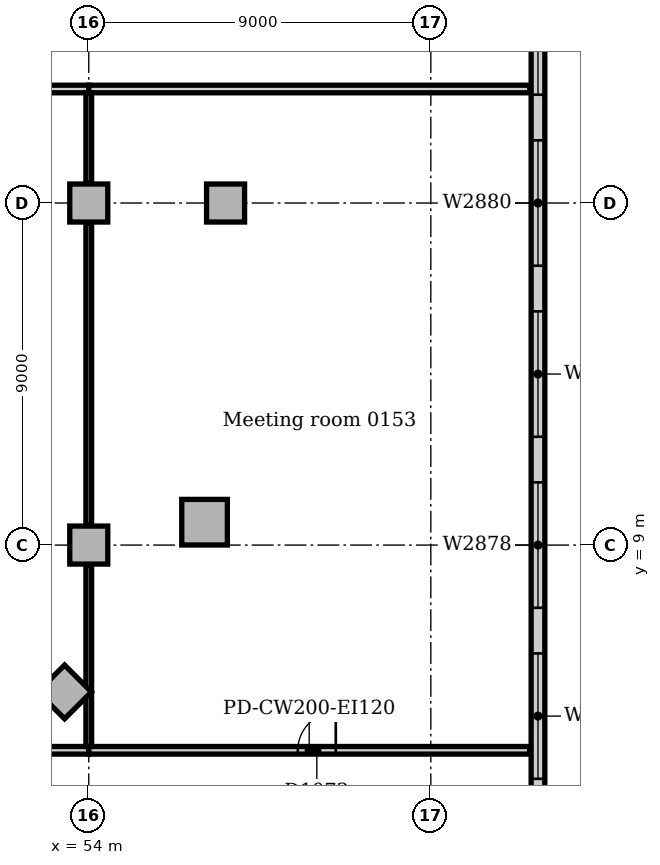
"""IFC4 building model, lengths in metres.
Left out: names, types, materials, properties, quantities, classifications, styles, units other than length and angle.
Written with IfcOpenShell. Run it as: python <this file> out.ifc"""

import sys

from ifc_helpers import new_model, si_unit, direction, frame, frame_2d, origin, origin_2d, place, context, subcontext, project, spatial, rectangle, extrude, element, fill, save


model = new_model("IFC4")
c1 = context("Model", 3, precision=1e-05, world=origin(), true_north=direction((0.0, 1.0)))
c2 = subcontext(c1, "Body", "Model", "MODEL_VIEW")
j1 = project(units=[si_unit("LENGTHUNIT", "METRE"), si_unit("PLANEANGLEUNIT", "RADIAN")], contexts=[c1])
p1 = place(None, origin())
s1 = spatial("IfcSite", under=j1, at=p1, CompositionType="ELEMENT")
p2 = place(p1, origin())
s2 = spatial("IfcBuilding", under=s1, at=p2, CompositionType="ELEMENT")
p3 = place(p2, frame((0.0, 0.0, 6.0)))
s3 = spatial("IfcBuildingStorey", under=s2, at=p3, CompositionType="ELEMENT", Elevation=6.0)
p4 = place(p3, frame((57.047, 9.602, 0.0), z_axis=(0.0, 0.0, 1.0), x_axis=(1.0, 0.0, 0.0)))
e1 = element("IfcColumn", 1, at=p4, inside=s3, PredefinedType="COLUMN", context=c2, shape_type="SweptSolid", body=[
    extrude(rectangle(XDim=1.2, YDim=1.2, at=origin_2d()), origin(), (0.0, 0.0, 1.0), 4.7),
])
for number, where, z_axis, x_axis in (
    (2, (53.364, 5.136, 0.0), (0.0, 0.0, 1.0), (0.707, 0.707, 0.0)),
    (3, (57.6, 18.0, 0.0), (0.0, 0.0, 1.0), (1.0, 0.0, 0.0)),
    (4, (54.0, 9.0, 0.0), (0.0, 0.0, 1.0), (1.0, 0.0, 0.0)),
    (5, (54.0, 18.0, 0.0), (0.0, 0.0, 1.0), (1.0, 0.0, 0.0)),
):
    element("IfcColumn", number, at=place(p3, frame(where, z_axis=z_axis, x_axis=x_axis)), inside=s3, PredefinedType="COLUMN", context=c2, shape_type="SweptSolid", body=[
        extrude(rectangle(XDim=1.0, YDim=1.0, at=origin_2d()), origin(), (0.0, 0.0, 1.0), 4.7),
    ])
p5 = place(p3, frame((65.82, -9.0, 0.0), z_axis=(0.0, 0.0, 1.0), x_axis=(0.0, 1.0, 0.0)))
e6 = element("IfcWall", 6, at=p5, inside=s3, PredefinedType="STANDARD", context=c2, shape_type="SweptSolid", body=[
    extrude(rectangle(XDim=63.0, YDim=0.36, at=frame_2d((31.5, 0.0))), origin(), (0.0, 0.0, 1.0), 4.7),
])
p6 = place(p5, frame((2.85, 0.0, 0.9)))
e7 = element("IfcOpeningElement", 7, at=p6, cuts=e6, PredefinedType="OPENING", context=c2, shape_type="SweptSolid", body=[
    extrude(rectangle(XDim=3.3, YDim=2.4, at=frame_2d((1.65, 1.2))), frame((0.0, 0.19, 0.0), z_axis=(0.0, -1.0, 0.0), x_axis=(1.0, 0.0, 0.0)), (0.0, 0.0, 1.0), 0.38),
])
p7 = place(p5, frame((7.35, 0.0, 0.9)))
e8 = element("IfcOpeningElement", 8, at=p7, cuts=e6, PredefinedType="OPENING", context=c2, shape_type="SweptSolid", body=[
    extrude(rectangle(XDim=3.3, YDim=2.4, at=frame_2d((1.65, 1.2))), frame((0.0, 0.19, 0.0), z_axis=(0.0, -1.0, 0.0), x_axis=(1.0, 0.0, 0.0)), (0.0, 0.0, 1.0), 0.38),
])
p8 = place(p5, frame((11.85, 0.0, 0.9)))
e9 = element("IfcOpeningElement", 9, at=p8, cuts=e6, PredefinedType="OPENING", context=c2, shape_type="SweptSolid", body=[
    extrude(rectangle(XDim=3.3, YDim=2.4, at=frame_2d((1.65, 1.2))), frame((0.0, 0.19, 0.0), z_axis=(0.0, -1.0, 0.0), x_axis=(1.0, 0.0, 0.0)), (0.0, 0.0, 1.0), 0.38),
])
p9 = place(p5, frame((16.35, 0.0, 0.9)))
e10 = element("IfcOpeningElement", 10, at=p9, cuts=e6, PredefinedType="OPENING", context=c2, shape_type="SweptSolid", body=[
    extrude(rectangle(XDim=3.3, YDim=2.4, at=frame_2d((1.65, 1.2))), frame((0.0, 0.19, 0.0), z_axis=(0.0, -1.0, 0.0), x_axis=(1.0, 0.0, 0.0)), (0.0, 0.0, 1.0), 0.38),
])
p10 = place(p5, frame((20.85, 0.0, 0.9)))
e11 = element("IfcOpeningElement", 11, at=p10, cuts=e6, PredefinedType="OPENING", context=c2, shape_type="SweptSolid", body=[
    extrude(rectangle(XDim=3.3, YDim=2.4, at=frame_2d((1.65, 1.2))), frame((0.0, 0.19, 0.0), z_axis=(0.0, -1.0, 0.0), x_axis=(1.0, 0.0, 0.0)), (0.0, 0.0, 1.0), 0.38),
])
p11 = place(p5, frame((25.35, 0.0, 0.9)))
e12 = element("IfcOpeningElement", 12, at=p11, cuts=e6, PredefinedType="OPENING", context=c2, shape_type="SweptSolid", body=[
    extrude(rectangle(XDim=3.3, YDim=2.4, at=frame_2d((1.65, 1.2))), frame((0.0, 0.19, 0.0), z_axis=(0.0, -1.0, 0.0), x_axis=(1.0, 0.0, 0.0)), (0.0, 0.0, 1.0), 0.38),
])
p12 = place(p5, frame((29.85, 0.0, 0.9)))
e13 = element("IfcOpeningElement", 13, at=p12, cuts=e6, PredefinedType="OPENING", context=c2, shape_type="SweptSolid", body=[
    extrude(rectangle(XDim=3.3, YDim=2.4, at=frame_2d((1.65, 1.2))), frame((0.0, 0.19, 0.0), z_axis=(0.0, -1.0, 0.0), x_axis=(1.0, 0.0, 0.0)), (0.0, 0.0, 1.0), 0.38),
])
p13 = place(p5, frame((34.35, 0.0, 0.9)))
e14 = element("IfcOpeningElement", 14, at=p13, cuts=e6, PredefinedType="OPENING", context=c2, shape_type="SweptSolid", body=[
    extrude(rectangle(XDim=3.3, YDim=2.4, at=frame_2d((1.65, 1.2))), frame((0.0, 0.19, 0.0), z_axis=(0.0, -1.0, 0.0), x_axis=(1.0, 0.0, 0.0)), (0.0, 0.0, 1.0), 0.38),
])
p14 = place(p5, frame((38.85, 0.0, 0.9)))
e15 = element("IfcOpeningElement", 15, at=p14, cuts=e6, PredefinedType="OPENING", context=c2, shape_type="SweptSolid", body=[
    extrude(rectangle(XDim=3.3, YDim=2.4, at=frame_2d((1.65, 1.2))), frame((0.0, 0.19, 0.0), z_axis=(0.0, -1.0, 0.0), x_axis=(1.0, 0.0, 0.0)), (0.0, 0.0, 1.0), 0.38),
])
p15 = place(p5, frame((43.35, 0.0, 0.9)))
e16 = element("IfcOpeningElement", 16, at=p15, cuts=e6, PredefinedType="OPENING", context=c2, shape_type="SweptSolid", body=[
    extrude(rectangle(XDim=3.3, YDim=2.4, at=frame_2d((1.65, 1.2))), frame((0.0, 0.19, 0.0), z_axis=(0.0, -1.0, 0.0), x_axis=(1.0, 0.0, 0.0)), (0.0, 0.0, 1.0), 0.38),
])
p16 = place(p5, frame((47.85, 0.0, 0.9)))
e17 = element("IfcOpeningElement", 17, at=p16, cuts=e6, PredefinedType="OPENING", context=c2, shape_type="SweptSolid", body=[
    extrude(rectangle(XDim=3.3, YDim=2.4, at=frame_2d((1.65, 1.2))), frame((0.0, 0.19, 0.0), z_axis=(0.0, -1.0, 0.0), x_axis=(1.0, 0.0, 0.0)), (0.0, 0.0, 1.0), 0.38),
])
p17 = place(p5, frame((52.35, 0.0, 0.9)))
e18 = element("IfcOpeningElement", 18, at=p17, cuts=e6, PredefinedType="OPENING", context=c2, shape_type="SweptSolid", body=[
    extrude(rectangle(XDim=3.3, YDim=2.4, at=frame_2d((1.65, 1.2))), frame((0.0, 0.19, 0.0), z_axis=(0.0, -1.0, 0.0), x_axis=(1.0, 0.0, 0.0)), (0.0, 0.0, 1.0), 0.38),
])
p18 = place(p5, frame((56.85, 0.0, 0.9)))
e19 = element("IfcOpeningElement", 19, at=p18, cuts=e6, PredefinedType="OPENING", context=c2, shape_type="SweptSolid", body=[
    extrude(rectangle(XDim=3.3, YDim=2.4, at=frame_2d((1.65, 1.2))), frame((0.0, 0.19, 0.0), z_axis=(0.0, -1.0, 0.0), x_axis=(1.0, 0.0, 0.0)), (0.0, 0.0, 1.0), 0.38),
])
p19 = place(p3, frame((45.0, 3.6, 0.0), z_axis=(0.0, 0.0, 1.0), x_axis=(1.0, 0.0, 0.0)))
e20 = element("IfcWall", 20, at=p19, inside=s3, PredefinedType="PARTITIONING", context=c2, shape_type="SweptSolid", body=[
    extrude(rectangle(XDim=9.0, YDim=0.2, at=frame_2d((4.5, 0.0))), origin(), (0.0, 0.0, 1.0), 4.7),
])
p20 = place(p19, frame((4.0, 0.0, 0.0)))
e21 = element("IfcOpeningElement", 21, at=p20, cuts=e20, PredefinedType="OPENING", context=c2, shape_type="SweptSolid", body=[
    extrude(rectangle(XDim=1.0, YDim=2.1, at=frame_2d((0.5, 1.05))), frame((0.0, 0.11, 0.0), z_axis=(0.0, -1.0, 0.0), x_axis=(1.0, 0.0, 0.0)), (0.0, 0.0, 1.0), 0.22),
])
p21 = place(p3, frame((54.0, 3.6, 0.0), z_axis=(0.0, 0.0, 1.0), x_axis=(1.0, 0.0, 0.0)))
e22 = element("IfcWall", 22, at=p21, inside=s3, PredefinedType="PARTITIONING", context=c2, shape_type="SweptSolid", body=[
    extrude(rectangle(XDim=11.6, YDim=0.2, at=frame_2d((5.8, 0.0))), origin(), (0.0, 0.0, 1.0), 4.7),
])
p22 = place(p21, frame((5.5, 0.0, 0.0)))
e23 = element("IfcOpeningElement", 23, at=p22, cuts=e22, PredefinedType="OPENING", context=c2, shape_type="SweptSolid", body=[
    extrude(rectangle(XDim=1.0, YDim=2.1, at=frame_2d((0.5, 1.05))), frame((0.0, 0.11, 0.0), z_axis=(0.0, -1.0, 0.0), x_axis=(1.0, 0.0, 0.0)), (0.0, 0.0, 1.0), 0.22),
])
p23 = place(p3, frame((45.0, 21.0, 0.0), z_axis=(0.0, 0.0, 1.0), x_axis=(1.0, 0.0, 0.0)))
e24 = element("IfcWall", 24, at=p23, inside=s3, PredefinedType="PARTITIONING", context=c2, shape_type="SweptSolid", body=[
    extrude(rectangle(XDim=9.0, YDim=0.2, at=frame_2d((4.5, 0.0))), origin(), (0.0, 0.0, 1.0), 4.7),
])
p24 = place(p3, frame((54.0, 21.0, 0.0), z_axis=(0.0, 0.0, 1.0), x_axis=(1.0, 0.0, 0.0)))
e25 = element("IfcWall", 25, at=p24, inside=s3, PredefinedType="PARTITIONING", context=c2, shape_type="SweptSolid", body=[
    extrude(rectangle(XDim=11.6, YDim=0.2, at=frame_2d((5.8, 0.0))), origin(), (0.0, 0.0, 1.0), 4.7),
])
p25 = place(p3, frame((54.0, 3.7, 0.0), z_axis=(0.0, 0.0, 1.0), x_axis=(0.0, 1.0, 0.0)))
e26 = element("IfcWall", 26, at=p25, inside=s3, PredefinedType="PARTITIONING", context=c2, shape_type="SweptSolid", body=[
    extrude(rectangle(XDim=4.78, YDim=0.15, at=frame_2d((2.39, 0.0))), origin(), (0.0, 0.0, 1.0), 4.7),
])
p26 = place(p3, frame((54.0, 9.52, 0.0), z_axis=(0.0, 0.0, 1.0), x_axis=(0.0, 1.0, 0.0)))
e27 = element("IfcWall", 27, at=p26, inside=s3, PredefinedType="PARTITIONING", context=c2, shape_type="SweptSolid", body=[
    extrude(rectangle(XDim=7.96, YDim=0.15, at=frame_2d((3.98, 0.0))), origin(), (0.0, 0.0, 1.0), 4.7),
])
p27 = place(p3, frame((54.0, 18.52, 0.0), z_axis=(0.0, 0.0, 1.0), x_axis=(0.0, 1.0, 0.0)))
e28 = element("IfcWall", 28, at=p27, inside=s3, PredefinedType="PARTITIONING", context=c2, shape_type="SweptSolid", body=[
    extrude(rectangle(XDim=2.38, YDim=0.15, at=frame_2d((1.19, 0.0))), origin(), (0.0, 0.0, 1.0), 4.7),
])
p28 = place(p8, origin())
e29 = element("IfcWindow", 29, at=p28, inside=s3, PartitioningType="SINGLE_PANEL", PredefinedType="WINDOW", context=c2, shape_type="SweptSolid", body=[
    extrude(rectangle(XDim=3.3, YDim=2.4, at=frame_2d((1.65, 1.2))), frame((0.0, 0.13, 0.0), z_axis=(0.0, -1.0, 0.0), x_axis=(1.0, 0.0, 0.0)), (0.0, 0.0, 1.0), 0.06),
])
fill(e9, e29)
p29 = place(p9, origin())
e30 = element("IfcWindow", 30, at=p29, inside=s3, PartitioningType="SINGLE_PANEL", PredefinedType="WINDOW", context=c2, shape_type="SweptSolid", body=[
    extrude(rectangle(XDim=3.3, YDim=2.4, at=frame_2d((1.65, 1.2))), frame((0.0, 0.13, 0.0), z_axis=(0.0, -1.0, 0.0), x_axis=(1.0, 0.0, 0.0)), (0.0, 0.0, 1.0), 0.06),
])
fill(e10, e30)
p30 = place(p10, origin())
e31 = element("IfcWindow", 31, at=p30, inside=s3, PartitioningType="SINGLE_PANEL", PredefinedType="WINDOW", context=c2, shape_type="SweptSolid", body=[
    extrude(rectangle(XDim=3.3, YDim=2.4, at=frame_2d((1.65, 1.2))), frame((0.0, 0.13, 0.0), z_axis=(0.0, -1.0, 0.0), x_axis=(1.0, 0.0, 0.0)), (0.0, 0.0, 1.0), 0.06),
])
fill(e11, e31)
p31 = place(p11, origin())
e32 = element("IfcWindow", 32, at=p31, inside=s3, PartitioningType="SINGLE_PANEL", PredefinedType="WINDOW", context=c2, shape_type="SweptSolid", body=[
    extrude(rectangle(XDim=3.3, YDim=2.4, at=frame_2d((1.65, 1.2))), frame((0.0, 0.13, 0.0), z_axis=(0.0, -1.0, 0.0), x_axis=(1.0, 0.0, 0.0)), (0.0, 0.0, 1.0), 0.06),
])
fill(e12, e32)
p32 = place(p12, origin())
e33 = element("IfcWindow", 33, at=p32, inside=s3, PartitioningType="SINGLE_PANEL", PredefinedType="WINDOW", context=c2, shape_type="SweptSolid", body=[
    extrude(rectangle(XDim=3.3, YDim=2.4, at=frame_2d((1.65, 1.2))), frame((0.0, 0.13, 0.0), z_axis=(0.0, -1.0, 0.0), x_axis=(1.0, 0.0, 0.0)), (0.0, 0.0, 1.0), 0.06),
])
fill(e13, e33)
p33 = place(p22, origin())
e34 = element("IfcDoor", 34, at=p33, inside=s3, OperationType="SINGLE_SWING_RIGHT", PredefinedType="DOOR", context=c2, shape_type="SweptSolid", body=[
    extrude(rectangle(XDim=1.0, YDim=2.1, at=frame_2d((0.5, 1.05))), frame((0.0, 0.025, 0.0), z_axis=(0.0, -1.0, 0.0), x_axis=(1.0, 0.0, 0.0)), (0.0, 0.0, 1.0), 0.05),
])
fill(e23, e34)
save(model, sys.argv[1])
